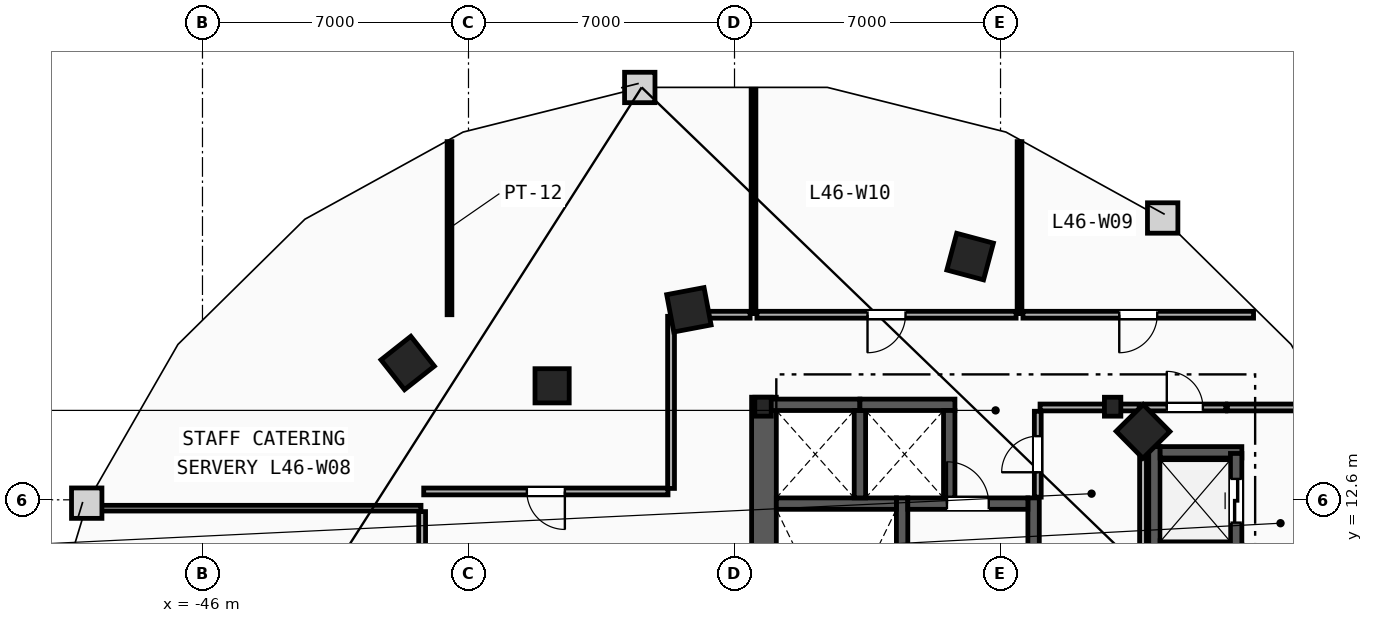
"""IFC4 building model, lengths in metres.
Left out: names, types, materials, properties, quantities, classifications, styles, units other than length and angle.
Written with IfcOpenShell. Run it as: python <this file> out.ifc"""

import sys

from ifc_helpers import new_model, si_unit, direction, frame, frame_2d, origin, origin_2d, place, context, subcontext, project, spatial, rectangle, i_section, extrude, element, fill, save


model = new_model("IFC4")
c1 = context("Model", 3, precision=1e-05, world=origin(), true_north=direction((0.0, 1.0)))
c2 = subcontext(c1, "Body", "Model", "MODEL_VIEW")
j1 = project(units=[si_unit("LENGTHUNIT", "METRE"), si_unit("PLANEANGLEUNIT", "RADIAN")], contexts=[c1])
p1 = place(None, origin())
s1 = spatial("IfcSite", under=j1, at=p1, CompositionType="ELEMENT")
p2 = place(p1, origin())
s2 = spatial("IfcBuilding", under=s1, at=p2, CompositionType="ELEMENT")
p3 = place(p2, frame((0.0, 0.0, 176.4)))
s3 = spatial("IfcBuildingStorey", under=s2, at=p3, CompositionType="ELEMENT", Elevation=176.4)
for number, where, z_axis, x_axis in (
    (1, (-22.05, 15.05, 0.0), (0.0, 0.0, 1.0), (1.0, 0.0, 0.0)),
    (2, (-31.25, 15.05, 0.0), (0.0, 0.0, 1.0), (1.0, 0.0, 0.0)),
):
    element("IfcColumn", number, at=place(p3, frame(where, z_axis=z_axis, x_axis=x_axis)), inside=s3, PredefinedType="COLUMN", context=c2, shape_type="SweptSolid", body=[
        extrude(i_section(OverallWidth=0.432, OverallDepth=0.498, WebThickness=0.056, FlangeThickness=0.089, FilletRadius=0.018, at=origin_2d()), origin(), (0.0, 0.0, 1.0), 3.6),
    ])
p4 = place(p3, frame((-36.8, 15.6, 0.0), z_axis=(0.0, 0.0, 1.0), x_axis=(1.0, 0.0, 0.0)))
e3 = element("IfcColumn", 3, at=p4, inside=s3, PredefinedType="COLUMN", context=c2, shape_type="SweptSolid", body=[
    extrude(rectangle(XDim=0.9, YDim=0.9, at=origin_2d()), origin(), (0.0, 0.0, 1.0), 3.6),
])
for number, where, z_axis, x_axis in (
    (4, (-21.25, 14.4, 0.0), (0.0, 0.0, 1.0), (-0.703, 0.711, 0.0)),
    (5, (-25.8, 19.0, 0.0), (0.0, 0.0, 1.0), (-0.966, 0.259, 0.0)),
    (6, (-33.2, 17.6, 0.0), (0.0, 0.0, 1.0), (-0.983, -0.186, 0.0)),
    (7, (-40.6, 16.2, 0.0), (0.0, 0.0, 1.0), (-0.785, -0.619, 0.0)),
):
    element("IfcColumn", number, at=place(p3, frame(where, z_axis=z_axis, x_axis=x_axis)), inside=s3, PredefinedType="COLUMN", context=c2, shape_type="SweptSolid", body=[
        extrude(rectangle(XDim=1.0, YDim=1.0, at=origin_2d()), origin(), (0.0, 0.0, 1.0), 3.6),
    ])
p5 = place(p3, frame((-31.225, 1.97, 0.0), z_axis=(0.0, 0.0, 1.0), x_axis=(0.0, 1.0, 0.0)))
e8 = element("IfcWall", 8, at=p5, inside=s3, PredefinedType="SHEAR", context=c2, shape_type="SweptSolid", body=[
    extrude(rectangle(XDim=13.33, YDim=0.65, at=frame_2d((6.665, 0.0))), origin(), (0.0, 0.0, 1.0), 3.36),
])
for number, where, z_axis, x_axis in (
    (9, (-27.59, 1.97, 0.0), (0.0, 0.0, 1.0), (0.0, 1.0, 0.0)),
    (10, (-24.13, 1.97, 0.0), (0.0, 0.0, 1.0), (0.0, 1.0, 0.0)),
):
    element("IfcWall", number, at=place(p3, frame(where, z_axis=z_axis, x_axis=x_axis)), inside=s3, PredefinedType="SHEAR", context=c2, shape_type="SweptSolid", body=[
        extrude(rectangle(XDim=10.68, YDim=0.3, at=frame_2d((5.34, 0.0))), origin(), (0.0, 0.0, 1.0), 3.36),
    ])
p6 = place(p3, frame((-30.9, 12.5, 0.0), z_axis=(0.0, 0.0, 1.0), x_axis=(1.0, 0.0, 0.0)))
e11 = element("IfcWall", 11, at=p6, inside=s3, PredefinedType="SHEAR", context=c2, shape_type="SweptSolid", body=[
    extrude(rectangle(XDim=3.16, YDim=0.3, at=frame_2d((1.58, 0.0))), origin(), (0.0, 0.0, 1.0), 3.36),
])
p7 = place(p3, frame((-27.44, 12.5, 0.0), z_axis=(0.0, 0.0, 1.0), x_axis=(1.0, 0.0, 0.0)))
e12 = element("IfcWall", 12, at=p7, inside=s3, PredefinedType="SHEAR", context=c2, shape_type="SweptSolid", body=[
    extrude(rectangle(XDim=3.16, YDim=0.3, at=frame_2d((1.58, 0.0))), origin(), (0.0, 0.0, 1.0), 3.36),
])
p8 = place(p7, frame((1.03, 0.0, 0.0)))
e13 = element("IfcOpeningElement", 13, at=p8, cuts=e12, PredefinedType="OPENING", context=c2, shape_type="SweptSolid", body=[
    extrude(rectangle(XDim=1.1, YDim=2.15, at=frame_2d((0.55, 1.075))), frame((0.0, 0.16, 0.0), z_axis=(0.0, -1.0, 0.0), x_axis=(1.0, 0.0, 0.0)), (0.0, 0.0, 1.0), 0.32),
])
p9 = place(p3, frame((-31.2, 15.1, 0.0), z_axis=(0.0, 0.0, 1.0), x_axis=(1.0, 0.0, 0.0)))
e14 = element("IfcWall", 14, at=p9, inside=s3, PredefinedType="SHEAR", context=c2, shape_type="SweptSolid", body=[
    extrude(rectangle(XDim=2.5, YDim=0.3, at=frame_2d((1.25, 0.0))), origin(), (0.0, 0.0, 1.0), 3.36),
])
p10 = place(p3, frame((-28.7, 12.65, 0.0), z_axis=(0.0, 0.0, 1.0), x_axis=(0.0, 1.0, 0.0)))
e15 = element("IfcWall", 15, at=p10, inside=s3, PredefinedType="SHEAR", context=c2, shape_type="SweptSolid", body=[
    extrude(rectangle(XDim=2.3, YDim=0.3, at=frame_2d((1.15, 0.0))), origin(), (0.0, 0.0, 1.0), 3.36),
])
p11 = place(p3, frame((-28.7, 15.1, 0.0), z_axis=(0.0, 0.0, 1.0), x_axis=(1.0, 0.0, 0.0)))
e16 = element("IfcWall", 16, at=p11, inside=s3, PredefinedType="SHEAR", context=c2, shape_type="SweptSolid", body=[
    extrude(rectangle(XDim=2.5, YDim=0.3, at=frame_2d((1.25, 0.0))), origin(), (0.0, 0.0, 1.0), 3.36),
])
p12 = place(p3, frame((-26.35, 12.65, 0.0), z_axis=(0.0, 0.0, 1.0), x_axis=(0.0, 1.0, 0.0)))
e17 = element("IfcWall", 17, at=p12, inside=s3, PredefinedType="SHEAR", context=c2, shape_type="SweptSolid", body=[
    extrude(rectangle(XDim=2.3, YDim=0.3, at=frame_2d((1.15, 0.0))), origin(), (0.0, 0.0, 1.0), 3.36),
])
p13 = place(p3, frame((-20.95, 8.75, 0.0), z_axis=(0.0, 0.0, 1.0), x_axis=(0.0, 1.0, 0.0)))
e18 = element("IfcWall", 18, at=p13, inside=s3, PredefinedType="SHEAR", context=c2, shape_type="SweptSolid", body=[
    extrude(rectangle(XDim=5.25, YDim=0.3, at=frame_2d((2.625, 0.0))), origin(), (0.0, 0.0, 1.0), 3.36),
])
p14 = place(p3, frame((-20.8, 13.85, 0.0), z_axis=(0.0, 0.0, 1.0), x_axis=(1.0, 0.0, 0.0)))
e19 = element("IfcWall", 19, at=p14, inside=s3, PredefinedType="SHEAR", context=c2, shape_type="SweptSolid", body=[
    extrude(rectangle(XDim=2.15, YDim=0.3, at=frame_2d((1.075, 0.0))), origin(), (0.0, 0.0, 1.0), 3.36),
])
p15 = place(p3, frame((-20.8, 11.375, 0.0), z_axis=(0.0, 0.0, 1.0), x_axis=(1.0, 0.0, 0.0)))
e20 = element("IfcWall", 20, at=p15, inside=s3, PredefinedType="SHEAR", context=c2, shape_type="SweptSolid", body=[
    extrude(rectangle(XDim=1.85, YDim=0.3, at=frame_2d((0.925, 0.0))), origin(), (0.0, 0.0, 1.0), 3.36),
])
p16 = place(p3, frame((-18.8, 11.33, 0.0), z_axis=(0.0, 0.0, 1.0), x_axis=(0.0, 1.0, 0.0)))
e21 = element("IfcWall", 21, at=p16, inside=s3, PredefinedType="SHEAR", context=c2, shape_type="SweptSolid", body=[
    extrude(rectangle(XDim=2.49, YDim=0.3, at=frame_2d((1.245, 0.0))), origin(), (0.0, 0.0, 1.0), 3.36),
])
p17 = place(p16, frame((0.67, 0.0, 0.0)))
e22 = element("IfcOpeningElement", 22, at=p17, cuts=e21, PredefinedType="OPENING", context=c2, shape_type="SweptSolid", body=[
    extrude(rectangle(XDim=1.15, YDim=2.2, at=frame_2d((0.575, 1.1))), frame((0.0, 0.16, 0.0), z_axis=(0.0, -1.0, 0.0), x_axis=(1.0, 0.0, 0.0)), (0.0, 0.0, 1.0), 0.32),
])
p18 = place(p3, frame((-21.23, 15.03, 0.0), z_axis=(0.0, 0.0, 1.0), x_axis=(1.0, 0.0, 0.0)))
e23 = element("IfcWall", 23, at=p18, inside=s3, PredefinedType="PARTITIONING", context=c2, shape_type="SweptSolid", body=[
    extrude(rectangle(XDim=2.16, YDim=0.18, at=frame_2d((1.08, 0.0))), origin(), (0.0, 0.0, 1.0), 3.36),
])
p19 = place(p18, frame((0.605, 0.0, 0.0)))
e24 = element("IfcOpeningElement", 24, at=p19, cuts=e23, PredefinedType="OPENING", context=c2, shape_type="SweptSolid", body=[
    extrude(rectangle(XDim=0.95, YDim=2.1, at=frame_2d((0.475, 1.05))), frame((0.0, 0.1, 0.0), z_axis=(0.0, -1.0, 0.0), x_axis=(1.0, 0.0, 0.0)), (0.0, 0.0, 1.0), 0.2),
])
p20 = place(p3, frame((-19.03, 15.03, 0.0), z_axis=(0.0, 0.0, 1.0), x_axis=(1.0, 0.0, 0.0)))
e25 = element("IfcWall", 25, at=p20, inside=s3, PredefinedType="PARTITIONING", context=c2, shape_type="SweptSolid", body=[
    extrude(rectangle(XDim=1.99, YDim=0.18, at=frame_2d((0.995, 0.0))), origin(), (0.0, 0.0, 1.0), 3.36),
])
p21 = place(p3, frame((-21.25, 10.57, 0.0), z_axis=(0.0, 0.0, 1.0), x_axis=(0.0, 1.0, 0.0)))
e26 = element("IfcWall", 26, at=p21, inside=s3, PredefinedType="PARTITIONING", context=c2, shape_type="SweptSolid", body=[
    extrude(rectangle(XDim=4.36, YDim=0.18, at=frame_2d((2.18, 0.0))), origin(), (0.0, 0.0, 1.0), 3.36),
])
p22 = place(p3, frame((-23.96, 15.03, 0.0), z_axis=(0.0, 0.0, 1.0), x_axis=(1.0, 0.0, 0.0)))
e27 = element("IfcWall", 27, at=p22, inside=s3, PredefinedType="PARTITIONING", context=c2, shape_type="SweptSolid", body=[
    extrude(rectangle(XDim=2.61, YDim=0.18, at=frame_2d((1.305, 0.0))), origin(), (0.0, 0.0, 1.0), 2.433),
])
p23 = place(p3, frame((-24.02, 12.67, 0.0), z_axis=(0.0, 0.0, 1.0), x_axis=(0.0, 1.0, 0.0)))
e28 = element("IfcWall", 28, at=p23, inside=s3, PredefinedType="PARTITIONING", context=c2, shape_type="SweptSolid", body=[
    extrude(rectangle(XDim=2.26, YDim=0.18, at=frame_2d((1.13, 0.0))), origin(), (0.0, 0.0, 1.0), 3.36),
])
p24 = place(p23, frame((0.655, 0.0, 0.0)))
e29 = element("IfcOpeningElement", 29, at=p24, cuts=e28, PredefinedType="OPENING", context=c2, shape_type="SweptSolid", body=[
    extrude(rectangle(XDim=0.95, YDim=2.1, at=frame_2d((0.475, 1.05))), frame((0.0, 0.1, 0.0), z_axis=(0.0, -1.0, 0.0), x_axis=(1.0, 0.0, 0.0)), (0.0, 0.0, 1.0), 0.2),
])
p25 = place(p3, frame((-49.024, 12.38, 0.0), z_axis=(0.0, 0.0, 1.0), x_axis=(1.0, 0.0, 0.0)))
e30 = element("IfcWall", 30, at=p25, inside=s3, PredefinedType="PARTITIONING", context=c2, shape_type="SweptSolid", body=[
    extrude(rectangle(XDim=8.774, YDim=0.15, at=frame_2d((4.387, 0.0))), origin(), (0.0, 0.0, 1.0), 3.36),
])
p26 = place(p3, frame((-39.5, 17.47, 0.0), z_axis=(0.0, 0.0, 1.0), x_axis=(0.0, 1.0, 0.0)))
e31 = element("IfcWall", 31, at=p26, inside=s3, PredefinedType="PARTITIONING", context=c2, shape_type="SweptSolid", body=[
    extrude(rectangle(XDim=4.555, YDim=0.125, at=frame_2d((2.278, 0.0))), origin(), (0.0, 0.0, 1.0), 3.36),
])
p27 = place(p3, frame((-31.5, 17.5, 0.0), z_axis=(0.0, 0.0, 1.0), x_axis=(0.0, 1.0, 0.0)))
e32 = element("IfcWall", 32, at=p27, inside=s3, PredefinedType="PARTITIONING", context=c2, shape_type="SweptSolid", body=[
    extrude(rectangle(XDim=5.902, YDim=0.125, at=frame_2d((2.951, 0.0))), origin(), (0.0, 0.0, 1.0), 3.36),
])
p28 = place(p3, frame((-24.5, 17.5, 0.0), z_axis=(0.0, 0.0, 1.0), x_axis=(0.0, 1.0, 0.0)))
e33 = element("IfcWall", 33, at=p28, inside=s3, PredefinedType="PARTITIONING", context=c2, shape_type="SweptSolid", body=[
    extrude(rectangle(XDim=4.525, YDim=0.125, at=frame_2d((2.263, 0.0))), origin(), (0.0, 0.0, 1.0), 3.36),
])
p29 = place(p3, frame((-40.22, 12.29, 0.0), z_axis=(0.0, 0.0, 1.0), x_axis=(0.0, -1.0, 0.0)))
e34 = element("IfcWall", 34, at=p29, inside=s3, PredefinedType="PARTITIONING", context=c2, shape_type="SweptSolid", body=[
    extrude(rectangle(XDim=1.869, YDim=0.18, at=frame_2d((0.934, 0.0))), origin(), (0.0, 0.0, 1.0), 3.36),
])
p30 = place(p3, frame((-33.75, 12.82, 0.0), z_axis=(0.0, 0.0, 1.0), x_axis=(-1.0, 0.0, 0.0)))
e35 = element("IfcWall", 35, at=p30, inside=s3, PredefinedType="PARTITIONING", context=c2, shape_type="SweptSolid", body=[
    extrude(rectangle(XDim=6.428, YDim=0.18, at=frame_2d((3.214, 0.0))), origin(), (0.0, 0.0, 1.0), 3.36),
])
p31 = place(p30, frame((2.714, 0.0, 0.0)))
e36 = element("IfcOpeningElement", 36, at=p31, cuts=e35, PredefinedType="OPENING", context=c2, shape_type="SweptSolid", body=[
    extrude(rectangle(XDim=1.0, YDim=2.15, at=frame_2d((0.5, 1.075))), frame((0.0, 0.1, 0.0), z_axis=(0.0, -1.0, 0.0), x_axis=(1.0, 0.0, 0.0)), (0.0, 0.0, 1.0), 0.2),
])
p32 = place(p3, frame((-33.67, 17.428, 0.0), z_axis=(0.0, 0.0, 1.0), x_axis=(0.0, -1.0, 0.0)))
e37 = element("IfcWall", 37, at=p32, inside=s3, PredefinedType="PARTITIONING", context=c2, shape_type="SweptSolid", body=[
    extrude(rectangle(XDim=4.529, YDim=0.18, at=frame_2d((2.264, 0.0))), origin(), (0.0, 0.0, 1.0), 3.36),
])
p33 = place(p3, frame((-31.59, 17.47, 0.0), z_axis=(0.0, 0.0, 1.0), x_axis=(-1.0, 0.0, 0.0)))
e38 = element("IfcWall", 38, at=p33, inside=s3, PredefinedType="PARTITIONING", context=c2, shape_type="SweptSolid", body=[
    extrude(rectangle(XDim=2.038, YDim=0.18, at=frame_2d((1.019, 0.0))), origin(), (0.0, 0.0, 1.0), 3.36),
])
p34 = place(p3, frame((-18.342, 17.47, 0.0), z_axis=(0.0, 0.0, 1.0), x_axis=(-1.0, 0.0, 0.0)))
e39 = element("IfcWall", 39, at=p34, inside=s3, PredefinedType="PARTITIONING", context=c2, shape_type="SweptSolid", body=[
    extrude(rectangle(XDim=6.068, YDim=0.18, at=frame_2d((3.034, 0.0))), origin(), (0.0, 0.0, 1.0), 3.36),
])
p35 = place(p34, frame((2.534, 0.0, 0.0)))
e40 = element("IfcOpeningElement", 40, at=p35, cuts=e39, PredefinedType="OPENING", context=c2, shape_type="SweptSolid", body=[
    extrude(rectangle(XDim=1.0, YDim=2.15, at=frame_2d((0.5, 1.075))), frame((0.0, 0.1, 0.0), z_axis=(0.0, -1.0, 0.0), x_axis=(1.0, 0.0, 0.0)), (0.0, 0.0, 1.0), 0.2),
])
p36 = place(p3, frame((-24.59, 17.47, 0.0), z_axis=(0.0, 0.0, 1.0), x_axis=(-1.0, 0.0, 0.0)))
e41 = element("IfcWall", 41, at=p36, inside=s3, PredefinedType="PARTITIONING", context=c2, shape_type="SweptSolid", body=[
    extrude(rectangle(XDim=6.82, YDim=0.18, at=frame_2d((3.41, 0.0))), origin(), (0.0, 0.0, 1.0), 3.36),
])
p37 = place(p36, frame((2.91, 0.0, 0.0)))
e42 = element("IfcOpeningElement", 42, at=p37, cuts=e41, PredefinedType="OPENING", context=c2, shape_type="SweptSolid", body=[
    extrude(rectangle(XDim=1.0, YDim=2.15, at=frame_2d((0.5, 1.075))), frame((0.0, 0.1, 0.0), z_axis=(0.0, -1.0, 0.0), x_axis=(1.0, 0.0, 0.0)), (0.0, 0.0, 1.0), 0.2),
])
p38 = place(p8, origin())
e43 = element("IfcDoor", 43, at=p38, inside=s3, OperationType="SINGLE_SWING_LEFT", PredefinedType="DOOR", context=c2, shape_type="SweptSolid", body=[
    extrude(rectangle(XDim=1.1, YDim=2.15, at=frame_2d((0.55, 1.075))), frame((0.0, 0.025, 0.0), z_axis=(0.0, -1.0, 0.0), x_axis=(1.0, 0.0, 0.0)), (0.0, 0.0, 1.0), 0.05),
])
fill(e13, e43)
p39 = place(p17, origin())
e44 = element("IfcDoor", 44, at=p39, inside=s3, OperationType="SLIDING_TO_LEFT", PredefinedType="TRAPDOOR", context=c2, shape_type="SweptSolid", body=[
    extrude(rectangle(XDim=1.15, YDim=2.2, at=frame_2d((0.575, 1.1))), frame((0.0, 0.025, 0.0), z_axis=(0.0, -1.0, 0.0), x_axis=(1.0, 0.0, 0.0)), (0.0, 0.0, 1.0), 0.05),
])
fill(e22, e44)
p40 = place(p37, origin())
e45 = element("IfcDoor", 45, at=p40, inside=s3, OperationType="SINGLE_SWING_RIGHT", PredefinedType="DOOR", context=c2, shape_type="SweptSolid", body=[
    extrude(rectangle(XDim=1.0, YDim=2.15, at=frame_2d((0.5, 1.075))), frame((0.0, 0.025, 0.0), z_axis=(0.0, -1.0, 0.0), x_axis=(1.0, 0.0, 0.0)), (0.0, 0.0, 1.0), 0.05),
])
fill(e42, e45)
p41 = place(p31, origin())
e46 = element("IfcDoor", 46, at=p41, inside=s3, OperationType="SINGLE_SWING_LEFT", PredefinedType="DOOR", context=c2, shape_type="SweptSolid", body=[
    extrude(rectangle(XDim=1.0, YDim=2.15, at=frame_2d((0.5, 1.075))), frame((0.0, 0.025, 0.0), z_axis=(0.0, -1.0, 0.0), x_axis=(1.0, 0.0, 0.0)), (0.0, 0.0, 1.0), 0.05),
])
fill(e36, e46)
p42 = place(p35, origin())
e47 = element("IfcDoor", 47, at=p42, inside=s3, OperationType="SINGLE_SWING_RIGHT", PredefinedType="DOOR", context=c2, shape_type="SweptSolid", body=[
    extrude(rectangle(XDim=1.0, YDim=2.15, at=frame_2d((0.5, 1.075))), frame((0.0, 0.025, 0.0), z_axis=(0.0, -1.0, 0.0), x_axis=(1.0, 0.0, 0.0)), (0.0, 0.0, 1.0), 0.05),
])
fill(e40, e47)
p43 = place(p24, origin())
e48 = element("IfcDoor", 48, at=p43, inside=s3, OperationType="SINGLE_SWING_LEFT", PredefinedType="DOOR", context=c2, shape_type="SweptSolid", body=[
    extrude(rectangle(XDim=0.95, YDim=2.1, at=frame_2d((0.475, 1.05))), frame((0.0, 0.025, 0.0), z_axis=(0.0, -1.0, 0.0), x_axis=(1.0, 0.0, 0.0)), (0.0, 0.0, 1.0), 0.05),
])
fill(e29, e48)
p44 = place(p19, origin())
e49 = element("IfcDoor", 49, at=p44, inside=s3, OperationType="SINGLE_SWING_LEFT", PredefinedType="DOOR", context=c2, shape_type="SweptSolid", body=[
    extrude(rectangle(XDim=0.95, YDim=2.1, at=frame_2d((0.475, 1.05))), frame((0.0, 0.025, 0.0), z_axis=(0.0, -1.0, 0.0), x_axis=(1.0, 0.0, 0.0)), (0.0, 0.0, 1.0), 0.05),
])
fill(e24, e49)
save(model, sys.argv[1])
